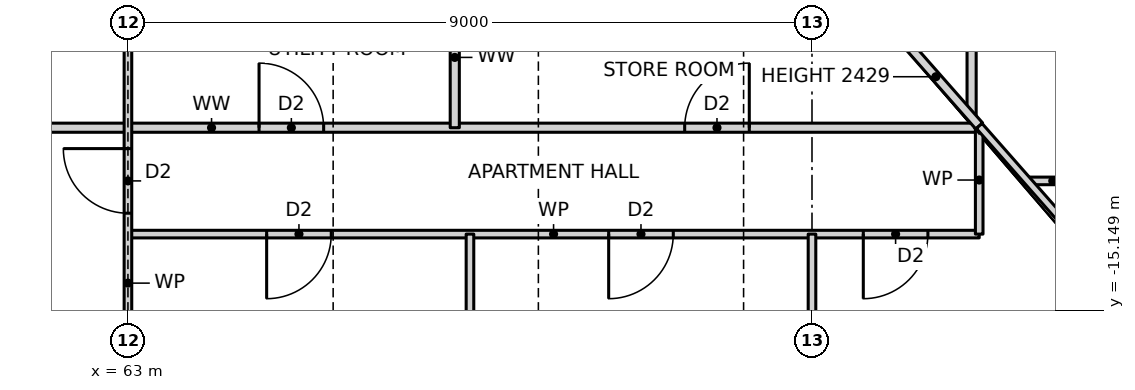
"""IFC4 building model, lengths in metres.
Left out: names, types, materials, properties, quantities, classifications, styles, units other than length and angle.
Written with IfcOpenShell. Run it as: python <this file> out.ifc"""

import sys

from ifc_helpers import new_model, si_unit, direction, frame, frame_2d, origin, place, context, subcontext, project, spatial, rectangle, extrude, element, fill, save


model = new_model("IFC4")
c1 = context("Model", 3, precision=1e-05, world=origin(), true_north=direction((0.0, 1.0)))
c2 = subcontext(c1, "Body", "Model", "MODEL_VIEW")
j1 = project(units=[si_unit("LENGTHUNIT", "METRE"), si_unit("PLANEANGLEUNIT", "RADIAN")], contexts=[c1])
p1 = place(None, origin())
s1 = spatial("IfcSite", under=j1, at=p1, CompositionType="ELEMENT")
p2 = place(p1, origin())
s2 = spatial("IfcBuilding", under=s1, at=p2, CompositionType="ELEMENT")
p3 = place(p2, frame((0.0, 0.0, 18.5)))
s3 = spatial("IfcBuildingStorey", under=s2, at=p3, CompositionType="ELEMENT", Elevation=18.5)
p4 = place(p3, frame((63.0, -14.15, 0.0), z_axis=(0.0, 0.0, 1.0), x_axis=(1.0, 0.0, 0.0)))
e1 = element("IfcWall", 1, at=p4, inside=s3, PredefinedType="PARTITIONING", context=c2, shape_type="SweptSolid", body=[
    extrude(rectangle(XDim=11.2, YDim=0.1, at=frame_2d((5.6, 0.0))), origin(), (0.0, 0.0, 1.0), 3.27),
])
p5 = place(p4, frame((1.825, 0.0, 0.0)))
e2 = element("IfcOpeningElement", 2, at=p5, cuts=e1, PredefinedType="OPENING", context=c2, shape_type="SweptSolid", body=[
    extrude(rectangle(XDim=0.85, YDim=2.1, at=frame_2d((0.425, 1.05))), frame((0.0, 0.06, 0.0), z_axis=(0.0, -1.0, 0.0), x_axis=(1.0, 0.0, 0.0)), (0.0, 0.0, 1.0), 0.12),
])
p6 = place(p4, frame((6.325, 0.0, 0.0)))
e3 = element("IfcOpeningElement", 3, at=p6, cuts=e1, PredefinedType="OPENING", context=c2, shape_type="SweptSolid", body=[
    extrude(rectangle(XDim=0.85, YDim=2.1, at=frame_2d((0.425, 1.05))), frame((0.0, 0.06, 0.0), z_axis=(0.0, -1.0, 0.0), x_axis=(1.0, 0.0, 0.0)), (0.0, 0.0, 1.0), 0.12),
])
p7 = place(p4, frame((9.675, 0.0, 0.0)))
e4 = element("IfcOpeningElement", 4, at=p7, cuts=e1, PredefinedType="OPENING", context=c2, shape_type="SweptSolid", body=[
    extrude(rectangle(XDim=0.85, YDim=2.1, at=frame_2d((0.425, 1.05))), frame((0.0, 0.06, 0.0), z_axis=(0.0, -1.0, 0.0), x_axis=(1.0, 0.0, 0.0)), (0.0, 0.0, 1.0), 0.12),
])
p8 = place(p3, frame((74.836, -13.45, 0.0), z_axis=(0.0, 0.0, 1.0), x_axis=(1.0, 0.0, 0.0)))
e5 = element("IfcWall", 5, at=p8, inside=s3, PredefinedType="PARTITIONING", context=c2, shape_type="SweptSolid", body=[
    extrude(rectangle(XDim=0.664, YDim=0.1, at=frame_2d((0.332, 0.0))), origin(), (0.0, 0.0, 1.0), 3.27),
])
p9 = place(p3, frame((54.0, -12.75, 0.0), z_axis=(0.0, 0.0, 1.0), x_axis=(1.0, 0.0, 0.0)))
e6 = element("IfcWall", 6, at=p9, inside=s3, PredefinedType="PARTITIONING", context=c2, shape_type="SweptSolid", body=[
    extrude(rectangle(XDim=20.2, YDim=0.12, at=frame_2d((10.1, 0.0))), origin(), (0.0, 0.0, 1.0), 3.27),
])
p10 = place(p9, frame((1.375, 0.0, 0.0)))
e7 = element("IfcOpeningElement", 7, at=p10, cuts=e6, PredefinedType="OPENING", context=c2, shape_type="SweptSolid", body=[
    extrude(rectangle(XDim=0.85, YDim=2.1, at=frame_2d((0.425, 1.05))), frame((0.0, 0.07, 0.0), z_axis=(0.0, -1.0, 0.0), x_axis=(1.0, 0.0, 0.0)), (0.0, 0.0, 1.0), 0.14),
])
p11 = place(p9, frame((4.575, 0.0, 0.0)))
e8 = element("IfcOpeningElement", 8, at=p11, cuts=e6, PredefinedType="OPENING", context=c2, shape_type="SweptSolid", body=[
    extrude(rectangle(XDim=0.85, YDim=2.1, at=frame_2d((0.425, 1.05))), frame((0.0, 0.07, 0.0), z_axis=(0.0, -1.0, 0.0), x_axis=(1.0, 0.0, 0.0)), (0.0, 0.0, 1.0), 0.14),
])
p12 = place(p9, frame((10.725, 0.0, 0.0)))
e9 = element("IfcOpeningElement", 9, at=p12, cuts=e6, PredefinedType="OPENING", context=c2, shape_type="SweptSolid", body=[
    extrude(rectangle(XDim=0.85, YDim=2.1, at=frame_2d((0.425, 1.05))), frame((0.0, 0.07, 0.0), z_axis=(0.0, -1.0, 0.0), x_axis=(1.0, 0.0, 0.0)), (0.0, 0.0, 1.0), 0.14),
])
p13 = place(p9, frame((16.325, 0.0, 0.0)))
e10 = element("IfcOpeningElement", 10, at=p13, cuts=e6, PredefinedType="OPENING", context=c2, shape_type="SweptSolid", body=[
    extrude(rectangle(XDim=0.85, YDim=2.1, at=frame_2d((0.425, 1.05))), frame((0.0, 0.07, 0.0), z_axis=(0.0, -1.0, 0.0), x_axis=(1.0, 0.0, 0.0)), (0.0, 0.0, 1.0), 0.14),
])
p14 = place(p3, frame((74.2, -14.15, 0.0), z_axis=(0.0, 0.0, 1.0), x_axis=(0.0, 1.0, 0.0)))
e11 = element("IfcWall", 11, at=p14, inside=s3, PredefinedType="PARTITIONING", context=c2, shape_type="SweptSolid", body=[
    extrude(rectangle(XDim=1.423, YDim=0.1, at=frame_2d((0.711, 0.0))), origin(), (0.0, 0.0, 1.0), 3.27),
])
p15 = place(p3, frame((74.1, -12.614, 0.0), z_axis=(0.0, 0.0, 1.0), x_axis=(0.0, 1.0, 0.0)))
e12 = element("IfcWall", 12, at=p15, inside=s3, PredefinedType="PARTITIONING", context=c2, shape_type="SweptSolid", body=[
    extrude(rectangle(XDim=25.228, YDim=0.12, at=frame_2d((12.614, 0.0))), origin(), (0.0, 0.0, 1.0), 3.27),
])
p16 = place(p15, frame((7.239, 0.0, 0.0)))
e13 = element("IfcOpeningElement", 13, at=p16, cuts=e12, PredefinedType="OPENING", context=c2, shape_type="SweptSolid", body=[
    extrude(rectangle(XDim=0.85, YDim=2.1, at=frame_2d((0.425, 1.05))), frame((0.0, 0.07, 0.0), z_axis=(0.0, -1.0, 0.0), x_axis=(1.0, 0.0, 0.0)), (0.0, 0.0, 1.0), 0.14),
])
p17 = place(p15, frame((10.439, 0.0, 0.0)))
e14 = element("IfcOpeningElement", 14, at=p17, cuts=e12, PredefinedType="OPENING", context=c2, shape_type="SweptSolid", body=[
    extrude(rectangle(XDim=0.85, YDim=2.1, at=frame_2d((0.425, 1.05))), frame((0.0, 0.07, 0.0), z_axis=(0.0, -1.0, 0.0), x_axis=(1.0, 0.0, 0.0)), (0.0, 0.0, 1.0), 0.14),
])
p18 = place(p15, frame((2.507, 0.0, 0.0)))
e15 = element("IfcOpeningElement", 15, at=p18, cuts=e12, PredefinedType="OPENING", context=c2, shape_type="SweptSolid", body=[
    extrude(rectangle(XDim=0.85, YDim=2.1, at=frame_2d((0.425, 1.05))), frame((0.0, 0.07, 0.0), z_axis=(0.0, -1.0, 0.0), x_axis=(1.0, 0.0, 0.0)), (0.0, 0.0, 1.0), 0.14),
])
p19 = place(p15, frame((16.639, 0.0, 0.0)))
e16 = element("IfcOpeningElement", 16, at=p19, cuts=e12, PredefinedType="OPENING", context=c2, shape_type="SweptSolid", body=[
    extrude(rectangle(XDim=0.85, YDim=2.1, at=frame_2d((0.425, 1.05))), frame((0.0, 0.07, 0.0), z_axis=(0.0, -1.0, 0.0), x_axis=(1.0, 0.0, 0.0)), (0.0, 0.0, 1.0), 0.14),
])
p20 = place(p15, frame((21.821, 0.0, 0.0)))
e17 = element("IfcOpeningElement", 17, at=p20, cuts=e12, PredefinedType="OPENING", context=c2, shape_type="SweptSolid", body=[
    extrude(rectangle(XDim=0.85, YDim=2.1, at=frame_2d((0.425, 1.05))), frame((0.0, 0.07, 0.0), z_axis=(0.0, -1.0, 0.0), x_axis=(1.0, 0.0, 0.0)), (0.0, 0.0, 1.0), 0.14),
])
for number, where, z_axis, x_axis in (
    (18, (72.0, -18.69, 0.0), (0.0, 0.0, 1.0), (0.0, 1.0, 0.0)),
    (19, (67.5, -18.69, 0.0), (0.0, 0.0, 1.0), (0.0, 1.0, 0.0)),
):
    element("IfcWall", number, at=place(p3, frame(where, z_axis=z_axis, x_axis=x_axis)), inside=s3, PredefinedType="PARTITIONING", context=c2, shape_type="SweptSolid", body=[
        extrude(rectangle(XDim=4.54, YDim=0.1, at=frame_2d((2.27, 0.0))), origin(), (0.0, 0.0, 1.0), 3.27),
    ])
p21 = place(p3, frame((67.3, -12.75, 0.0), z_axis=(0.0, 0.0, 1.0), x_axis=(0.0, 1.0, 0.0)))
e20 = element("IfcWall", 20, at=p21, inside=s3, PredefinedType="PARTITIONING", context=c2, shape_type="SweptSolid", body=[
    extrude(rectangle(XDim=1.85, YDim=0.12, at=frame_2d((0.925, 0.0))), origin(), (0.0, 0.0, 1.0), 3.27),
])
p22 = place(p3, frame((63.0, -18.69, 0.0), z_axis=(0.0, 0.0, 1.0), x_axis=(0.0, 1.0, 0.0)))
e21 = element("IfcWall", 21, at=p22, inside=s3, PredefinedType="PARTITIONING", context=c2, shape_type="SweptSolid", body=[
    extrude(rectangle(XDim=7.79, YDim=0.1, at=frame_2d((3.895, 0.0))), origin(), (0.0, 0.0, 1.0), 2.587),
])
p23 = place(p22, frame((4.815, 0.0, 0.0)))
e22 = element("IfcOpeningElement", 22, at=p23, cuts=e21, PredefinedType="OPENING", context=c2, shape_type="SweptSolid", body=[
    extrude(rectangle(XDim=0.85, YDim=2.1, at=frame_2d((0.425, 1.05))), frame((0.0, 0.06, 0.0), z_axis=(0.0, -1.0, 0.0), x_axis=(1.0, 0.0, 0.0)), (0.0, 0.0, 1.0), 0.12),
])
p24 = place(p3, frame((74.2, -12.727, 0.0), z_axis=(0.0, 0.0, 1.0), x_axis=(-0.66059344937, 0.75074382758, 0.0)))
e23 = element("IfcWall", 23, at=p24, inside=s3, PredefinedType="PARTITIONING", context=c2, shape_type="SweptSolid", body=[
    extrude(rectangle(XDim=2.876, YDim=0.12, at=frame_2d((1.438, 0.0))), origin(), (0.0, 0.0, 1.0), 2.429),
])
p25 = place(p3, frame((78.057, -17.109, 0.0), z_axis=(0.0, 0.0, 1.0), x_axis=(-0.660654290516, 0.750690287951, 0.0)))
e24 = element("IfcWall", 24, at=p25, inside=s3, PredefinedType="PARTITIONING", context=c2, shape_type="SweptSolid", body=[
    extrude(rectangle(XDim=5.838, YDim=0.1, at=frame_2d((2.919, 0.0))), origin(), (0.0, 0.0, 1.0), 2.429),
])
p26 = place(p23, origin())
e25 = element("IfcDoor", 25, at=p26, inside=s3, OperationType="SINGLE_SWING_RIGHT", PredefinedType="DOOR", context=c2, shape_type="SweptSolid", body=[
    extrude(rectangle(XDim=0.85, YDim=2.1, at=frame_2d((0.425, 1.05))), frame((0.0, 0.025, 0.0), z_axis=(0.0, -1.0, 0.0), x_axis=(1.0, 0.0, 0.0)), (0.0, 0.0, 1.0), 0.05),
])
fill(e22, e25)
p27 = place(p5, frame((0.85, 0.0, 0.0), z_axis=(0.0, 0.0, 1.0), x_axis=(-1.0, 0.0, 0.0)))
e26 = element("IfcDoor", 26, at=p27, inside=s3, OperationType="SINGLE_SWING_RIGHT", PredefinedType="DOOR", context=c2, shape_type="SweptSolid", body=[
    extrude(rectangle(XDim=0.85, YDim=2.1, at=frame_2d((0.425, 1.05))), frame((0.0, 0.025, 0.0), z_axis=(0.0, -1.0, 0.0), x_axis=(1.0, 0.0, 0.0)), (0.0, 0.0, 1.0), 0.05),
])
fill(e2, e26)
p28 = place(p6, frame((0.85, 0.0, 0.0), z_axis=(0.0, 0.0, 1.0), x_axis=(-1.0, 0.0, 0.0)))
e27 = element("IfcDoor", 27, at=p28, inside=s3, OperationType="SINGLE_SWING_RIGHT", PredefinedType="DOOR", context=c2, shape_type="SweptSolid", body=[
    extrude(rectangle(XDim=0.85, YDim=2.1, at=frame_2d((0.425, 1.05))), frame((0.0, 0.025, 0.0), z_axis=(0.0, -1.0, 0.0), x_axis=(1.0, 0.0, 0.0)), (0.0, 0.0, 1.0), 0.05),
])
fill(e3, e27)
p29 = place(p7, frame((0.85, 0.0, 0.0), z_axis=(0.0, 0.0, 1.0), x_axis=(-1.0, 0.0, 0.0)))
e28 = element("IfcDoor", 28, at=p29, inside=s3, OperationType="SINGLE_SWING_RIGHT", PredefinedType="DOOR", context=c2, shape_type="SweptSolid", body=[
    extrude(rectangle(XDim=0.85, YDim=2.1, at=frame_2d((0.425, 1.05))), frame((0.0, 0.025, 0.0), z_axis=(0.0, -1.0, 0.0), x_axis=(1.0, 0.0, 0.0)), (0.0, 0.0, 1.0), 0.05),
])
fill(e4, e28)
p30 = place(p12, origin())
e29 = element("IfcDoor", 29, at=p30, inside=s3, OperationType="SINGLE_SWING_LEFT", PredefinedType="DOOR", context=c2, shape_type="SweptSolid", body=[
    extrude(rectangle(XDim=0.85, YDim=2.1, at=frame_2d((0.425, 1.05))), frame((0.0, 0.025, 0.0), z_axis=(0.0, -1.0, 0.0), x_axis=(1.0, 0.0, 0.0)), (0.0, 0.0, 1.0), 0.05),
])
fill(e9, e29)
p31 = place(p13, origin())
e30 = element("IfcDoor", 30, at=p31, inside=s3, OperationType="SINGLE_SWING_RIGHT", PredefinedType="DOOR", context=c2, shape_type="SweptSolid", body=[
    extrude(rectangle(XDim=0.85, YDim=2.1, at=frame_2d((0.425, 1.05))), frame((0.0, 0.025, 0.0), z_axis=(0.0, -1.0, 0.0), x_axis=(1.0, 0.0, 0.0)), (0.0, 0.0, 1.0), 0.05),
])
fill(e10, e30)
save(model, sys.argv[1])
